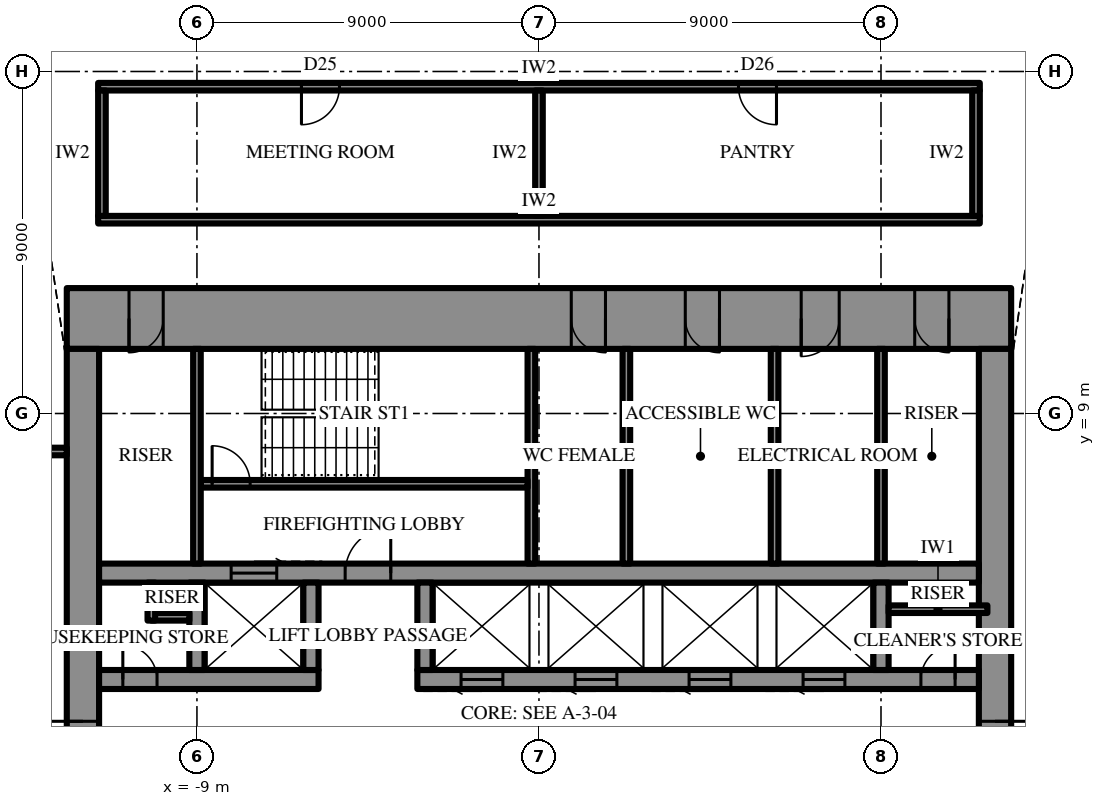
"""IFC4 building model, lengths in metres.
Left out: names, types, materials, properties, quantities, classifications, styles, units other than length and angle.
Written with IfcOpenShell. Run it as: python <this file> out.ifc"""

import sys

from ifc_helpers import new_model, si_unit, direction, frame, frame_2d, origin, place, context, subcontext, project, spatial, rectangle, extrude, element, fill, save


model = new_model("IFC4")
c1 = context("Model", 3, precision=1e-05, world=origin(), true_north=direction((0.0, 1.0)))
c2 = subcontext(c1, "Body", "Model", "MODEL_VIEW")
j1 = project(units=[si_unit("LENGTHUNIT", "METRE"), si_unit("PLANEANGLEUNIT", "RADIAN")], contexts=[c1])
p1 = place(None, origin())
s1 = spatial("IfcSite", under=j1, at=p1, CompositionType="ELEMENT")
p2 = place(p1, origin())
s2 = spatial("IfcBuilding", under=s1, at=p2, CompositionType="ELEMENT")
p3 = place(p2, frame((0.0, 0.0, 340.9)))
s3 = spatial("IfcBuildingStorey", under=s2, at=p3, CompositionType="ELEMENT", Elevation=340.9)
p4 = place(p3, frame((-12.425, 11.5, 0.0), z_axis=(0.0, 0.0, 1.0), x_axis=(1.0, 0.0, 0.0)))
e1 = element("IfcWall", 1, at=p4, inside=s3, PredefinedType="SHEAR", context=c2, shape_type="SweptSolid", body=[
    extrude(rectangle(XDim=24.85, YDim=1.6, at=frame_2d((12.425, 0.0))), origin(), (0.0, 0.0, 1.0), 4.2),
])
p5 = place(p4, frame((13.275, 0.0, 0.0)))
e2 = element("IfcOpeningElement", 2, at=p5, cuts=e1, PredefinedType="OPENING", context=c2, shape_type="SweptSolid", body=[
    extrude(rectangle(XDim=0.9, YDim=2.2, at=frame_2d((0.45, 1.1))), frame((0.0, 0.81, 0.0), z_axis=(0.0, -1.0, 0.0), x_axis=(1.0, 0.0, 0.0)), (0.0, 0.0, 1.0), 1.62),
])
p6 = place(p4, frame((16.275, 0.0, 0.0)))
e3 = element("IfcOpeningElement", 3, at=p6, cuts=e1, PredefinedType="OPENING", context=c2, shape_type="SweptSolid", body=[
    extrude(rectangle(XDim=0.9, YDim=2.2, at=frame_2d((0.45, 1.1))), frame((0.0, 0.81, 0.0), z_axis=(0.0, -1.0, 0.0), x_axis=(1.0, 0.0, 0.0)), (0.0, 0.0, 1.0), 1.62),
])
p7 = place(p4, frame((19.325, 0.0, 0.0)))
e4 = element("IfcOpeningElement", 4, at=p7, cuts=e1, PredefinedType="OPENING", context=c2, shape_type="SweptSolid", body=[
    extrude(rectangle(XDim=1.0, YDim=2.2, at=frame_2d((0.5, 1.1))), frame((0.0, 0.81, 0.0), z_axis=(0.0, -1.0, 0.0), x_axis=(1.0, 0.0, 0.0)), (0.0, 0.0, 1.0), 1.62),
])
p8 = place(p4, frame((1.637, 0.0, 0.0)))
e5 = element("IfcOpeningElement", 5, at=p8, cuts=e1, PredefinedType="OPENING", context=c2, shape_type="SweptSolid", body=[
    extrude(rectangle(XDim=0.9, YDim=2.2, at=frame_2d((0.45, 1.1))), frame((0.0, 0.81, 0.0), z_axis=(0.0, -1.0, 0.0), x_axis=(1.0, 0.0, 0.0)), (0.0, 0.0, 1.0), 1.62),
])
p9 = place(p4, frame((22.312, 0.0, 0.0)))
e6 = element("IfcOpeningElement", 6, at=p9, cuts=e1, PredefinedType="OPENING", context=c2, shape_type="SweptSolid", body=[
    extrude(rectangle(XDim=0.9, YDim=2.2, at=frame_2d((0.45, 1.1))), frame((0.0, 0.81, 0.0), z_axis=(0.0, -1.0, 0.0), x_axis=(1.0, 0.0, 0.0)), (0.0, 0.0, 1.0), 1.62),
])
p10 = place(p3, frame((12.0, -10.7, 0.0), z_axis=(0.0, 0.0, 1.0), x_axis=(0.0, 1.0, 0.0)))
e7 = element("IfcWall", 7, at=p10, inside=s3, PredefinedType="SHEAR", context=c2, shape_type="SweptSolid", body=[
    extrude(rectangle(XDim=21.4, YDim=0.85, at=frame_2d((10.7, 0.0))), origin(), (0.0, 0.0, 1.0), 4.2),
])
p11 = place(p10, frame((9.8, 0.0, 0.0)))
e8 = element("IfcOpeningElement", 8, at=p11, cuts=e7, PredefinedType="OPENING", context=c2, shape_type="SweptSolid", body=[
    extrude(rectangle(XDim=1.8, YDim=2.4, at=frame_2d((0.9, 1.2))), frame((0.0, 0.435, 0.0), z_axis=(0.0, -1.0, 0.0), x_axis=(1.0, 0.0, 0.0)), (0.0, 0.0, 1.0), 0.87),
])
p12 = place(p3, frame((-12.0, 10.7, 0.0), z_axis=(0.0, 0.0, 1.0), x_axis=(0.0, -1.0, 0.0)))
e9 = element("IfcWall", 9, at=p12, inside=s3, PredefinedType="SHEAR", context=c2, shape_type="SweptSolid", body=[
    extrude(rectangle(XDim=21.4, YDim=0.85, at=frame_2d((10.7, 0.0))), origin(), (0.0, 0.0, 1.0), 4.2),
])
p13 = place(p12, frame((9.8, 0.0, 0.0)))
e10 = element("IfcOpeningElement", 10, at=p13, cuts=e9, PredefinedType="OPENING", context=c2, shape_type="SweptSolid", body=[
    extrude(rectangle(XDim=1.8, YDim=2.4, at=frame_2d((0.9, 1.2))), frame((0.0, 0.435, 0.0), z_axis=(0.0, -1.0, 0.0), x_axis=(1.0, 0.0, 0.0)), (0.0, 0.0, 1.0), 0.87),
])
p14 = place(p3, frame((-11.575, 2.0, 0.0), z_axis=(0.0, 0.0, 1.0), x_axis=(1.0, 0.0, 0.0)))
e11 = element("IfcWall", 11, at=p14, inside=s3, PredefinedType="SHEAR", context=c2, shape_type="SweptSolid", body=[
    extrude(rectangle(XDim=5.775, YDim=0.5, at=frame_2d((2.887, 0.0))), origin(), (0.0, 0.0, 1.0), 4.2),
])
p15 = place(p14, frame((0.625, 0.0, 0.0)))
e12 = element("IfcOpeningElement", 12, at=p15, cuts=e11, PredefinedType="OPENING", context=c2, shape_type="SweptSolid", body=[
    extrude(rectangle(XDim=0.9, YDim=2.2, at=frame_2d((0.45, 1.1))), frame((0.0, 0.26, 0.0), z_axis=(0.0, -1.0, 0.0), x_axis=(1.0, 0.0, 0.0)), (0.0, 0.0, 1.0), 0.52),
])
p16 = place(p3, frame((-3.2, 2.0, 0.0), z_axis=(0.0, 0.0, 1.0), x_axis=(1.0, 0.0, 0.0)))
e13 = element("IfcWall", 13, at=p16, inside=s3, PredefinedType="SHEAR", context=c2, shape_type="SweptSolid", body=[
    extrude(rectangle(XDim=14.775, YDim=0.5, at=frame_2d((7.387, 0.0))), origin(), (0.0, 0.0, 1.0), 4.2),
])
p17 = place(p16, frame((13.25, 0.0, 0.0)))
e14 = element("IfcOpeningElement", 14, at=p17, cuts=e13, PredefinedType="OPENING", context=c2, shape_type="SweptSolid", body=[
    extrude(rectangle(XDim=0.9, YDim=2.2, at=frame_2d((0.45, 1.1))), frame((0.0, 0.26, 0.0), z_axis=(0.0, -1.0, 0.0), x_axis=(1.0, 0.0, 0.0)), (0.0, 0.0, 1.0), 0.52),
])
p18 = place(p16, frame((1.15, 0.0, 0.0)))
e15 = element("IfcOpeningElement", 15, at=p18, cuts=e13, PredefinedType="OPENING", context=c2, shape_type="SweptSolid", body=[
    extrude(rectangle(XDim=1.1, YDim=2.2, at=frame_2d((0.55, 1.1))), frame((0.0, 0.26, 0.0), z_axis=(0.0, -1.0, 0.0), x_axis=(1.0, 0.0, 0.0)), (0.0, 0.0, 1.0), 0.52),
])
p19 = place(p16, frame((4.15, 0.0, 0.0)))
e16 = element("IfcOpeningElement", 16, at=p19, cuts=e13, PredefinedType="OPENING", context=c2, shape_type="SweptSolid", body=[
    extrude(rectangle(XDim=1.1, YDim=2.2, at=frame_2d((0.55, 1.1))), frame((0.0, 0.26, 0.0), z_axis=(0.0, -1.0, 0.0), x_axis=(1.0, 0.0, 0.0)), (0.0, 0.0, 1.0), 0.52),
])
p20 = place(p16, frame((7.15, 0.0, 0.0)))
e17 = element("IfcOpeningElement", 17, at=p20, cuts=e13, PredefinedType="OPENING", context=c2, shape_type="SweptSolid", body=[
    extrude(rectangle(XDim=1.1, YDim=2.2, at=frame_2d((0.55, 1.1))), frame((0.0, 0.26, 0.0), z_axis=(0.0, -1.0, 0.0), x_axis=(1.0, 0.0, 0.0)), (0.0, 0.0, 1.0), 0.52),
])
p21 = place(p16, frame((10.15, 0.0, 0.0)))
e18 = element("IfcOpeningElement", 18, at=p21, cuts=e13, PredefinedType="OPENING", context=c2, shape_type="SweptSolid", body=[
    extrude(rectangle(XDim=1.1, YDim=2.2, at=frame_2d((0.55, 1.1))), frame((0.0, 0.26, 0.0), z_axis=(0.0, -1.0, 0.0), x_axis=(1.0, 0.0, 0.0)), (0.0, 0.0, 1.0), 0.52),
])
p22 = place(p3, frame((-11.575, 4.8, 0.0), z_axis=(0.0, 0.0, 1.0), x_axis=(1.0, 0.0, 0.0)))
e19 = element("IfcWall", 19, at=p22, inside=s3, PredefinedType="SHEAR", context=c2, shape_type="SweptSolid", body=[
    extrude(rectangle(XDim=23.15, YDim=0.5, at=frame_2d((11.575, 0.0))), origin(), (0.0, 0.0, 1.0), 4.2),
])
p23 = place(p22, frame((6.475, 0.0, 0.0)))
e20 = element("IfcOpeningElement", 20, at=p23, cuts=e19, PredefinedType="OPENING", context=c2, shape_type="SweptSolid", body=[
    extrude(rectangle(XDim=1.2, YDim=2.2, at=frame_2d((0.6, 1.1))), frame((0.0, 0.26, 0.0), z_axis=(0.0, -1.0, 0.0), x_axis=(1.0, 0.0, 0.0)), (0.0, 0.0, 1.0), 0.52),
])
p24 = place(p22, frame((3.475, 0.0, 0.0)))
e21 = element("IfcOpeningElement", 21, at=p24, cuts=e19, PredefinedType="OPENING", context=c2, shape_type="SweptSolid", body=[
    extrude(rectangle(XDim=1.2, YDim=2.2, at=frame_2d((0.6, 1.1))), frame((0.0, 0.26, 0.0), z_axis=(0.0, -1.0, 0.0), x_axis=(1.0, 0.0, 0.0)), (0.0, 0.0, 1.0), 0.52),
])
for number, where, z_axis, x_axis in (
    (22, (-9.0, 2.25, 0.0), (0.0, 0.0, 1.0), (0.0, 1.0, 0.0)),
    (23, (-6.0, 2.25, 0.0), (0.0, 0.0, 1.0), (0.0, 1.0, 0.0)),
    (24, (-3.0, 2.25, 0.0), (0.0, 0.0, 1.0), (0.0, 1.0, 0.0)),
    (25, (9.0, 2.25, 0.0), (0.0, 0.0, 1.0), (0.0, 1.0, 0.0)),
):
    element("IfcWall", number, at=place(p3, frame(where, z_axis=z_axis, x_axis=x_axis)), inside=s3, PredefinedType="SHEAR", context=c2, shape_type="SweptSolid", body=[
        extrude(rectangle(XDim=2.3, YDim=0.4, at=frame_2d((1.15, 0.0))), origin(), (0.0, 0.0, 1.0), 4.2),
    ])
p25 = place(p3, frame((-0.2, 5.05, 0.0), z_axis=(0.0, 0.0, 1.0), x_axis=(0.0, 1.0, 0.0)))
e26 = element("IfcWall", 26, at=p25, inside=s3, PredefinedType="SHEAR", context=c2, shape_type="SweptSolid", body=[
    extrude(rectangle(XDim=5.65, YDim=0.2, at=frame_2d((2.825, 0.0))), origin(), (0.0, 0.0, 1.0), 4.2),
])
p26 = place(p3, frame((-8.9, 7.15, 0.0), z_axis=(0.0, 0.0, 1.0), x_axis=(1.0, 0.0, 0.0)))
e27 = element("IfcWall", 27, at=p26, inside=s3, PredefinedType="SHEAR", context=c2, shape_type="SweptSolid", body=[
    extrude(rectangle(XDim=8.6, YDim=0.2, at=frame_2d((4.3, 0.0))), origin(), (0.0, 0.0, 1.0), 4.2),
])
p27 = place(p26, frame((0.3, 0.0, 0.0)))
e28 = element("IfcOpeningElement", 28, at=p27, cuts=e27, PredefinedType="OPENING", context=c2, shape_type="SweptSolid", body=[
    extrude(rectangle(XDim=1.0, YDim=2.2, at=frame_2d((0.5, 1.1))), frame((0.0, 0.11, 0.0), z_axis=(0.0, -1.0, 0.0), x_axis=(1.0, 0.0, 0.0)), (0.0, 0.0, 1.0), 0.22),
])
for number, where, z_axis, x_axis in (
    (29, (-9.0, 5.05, 0.0), (0.0, 0.0, 1.0), (0.0, 1.0, 0.0)),
    (30, (9.0, 5.05, 0.0), (0.0, 0.0, 1.0), (0.0, 1.0, 0.0)),
    (31, (2.3, 5.05, 0.0), (0.0, 0.0, 1.0), (0.0, 1.0, 0.0)),
    (32, (6.2, 5.05, 0.0), (0.0, 0.0, 1.0), (0.0, 1.0, 0.0)),
):
    element("IfcWall", number, at=place(p3, frame(where, z_axis=z_axis, x_axis=x_axis)), inside=s3, PredefinedType="PARTITIONING", context=c2, shape_type="SweptSolid", body=[
        extrude(rectangle(XDim=5.65, YDim=0.2, at=frame_2d((2.825, 0.0))), origin(), (0.0, 0.0, 1.0), 4.0),
    ])
for number, where, z_axis, x_axis in (
    (33, (-10.2, 3.65, 0.0), (0.0, 0.0, 1.0), (1.0, 0.0, 0.0)),
    (34, (-10.2, 3.55, 0.0), (0.0, 0.0, 1.0), (0.0, 1.0, 0.0)),
):
    element("IfcWall", number, at=place(p3, frame(where, z_axis=z_axis, x_axis=x_axis)), inside=s3, PredefinedType="PARTITIONING", context=c2, shape_type="SweptSolid", body=[
        extrude(rectangle(XDim=1.0, YDim=0.2, at=frame_2d((0.5, 0.0))), origin(), (0.0, 0.0, 1.0), 4.0),
    ])
p28 = place(p3, frame((9.2, 3.85, 0.0), z_axis=(0.0, 0.0, 1.0), x_axis=(1.0, 0.0, 0.0)))
e35 = element("IfcWall", 35, at=p28, inside=s3, PredefinedType="PARTITIONING", context=c2, shape_type="SweptSolid", body=[
    extrude(rectangle(XDim=2.6, YDim=0.2, at=frame_2d((1.3, 0.0))), origin(), (0.0, 0.0, 1.0), 4.0),
])
p29 = place(p3, frame((-11.6, 14.1, 0.0), z_axis=(0.0, 0.0, 1.0), x_axis=(1.0, 0.0, 0.0)))
e36 = element("IfcWall", 36, at=p29, inside=s3, PredefinedType="PARTITIONING", context=c2, shape_type="SweptSolid", body=[
    extrude(rectangle(XDim=23.2, YDim=0.2, at=frame_2d((11.6, 0.0))), origin(), (0.0, 0.0, 1.0), 4.0),
])
p30 = place(p3, frame((-11.6, 17.6, 0.0), z_axis=(0.0, 0.0, 1.0), x_axis=(1.0, 0.0, 0.0)))
e37 = element("IfcWall", 37, at=p30, inside=s3, PredefinedType="PARTITIONING", context=c2, shape_type="SweptSolid", body=[
    extrude(rectangle(XDim=23.2, YDim=0.2, at=frame_2d((11.6, 0.0))), origin(), (0.0, 0.0, 1.0), 4.0),
])
p31 = place(p30, frame((5.35, 0.0, 0.0)))
e38 = element("IfcOpeningElement", 38, at=p31, cuts=e37, PredefinedType="OPENING", context=c2, shape_type="SweptSolid", body=[
    extrude(rectangle(XDim=1.0, YDim=2.2, at=frame_2d((0.5, 1.1))), frame((0.0, 0.11, 0.0), z_axis=(0.0, -1.0, 0.0), x_axis=(1.0, 0.0, 0.0)), (0.0, 0.0, 1.0), 0.22),
])
p32 = place(p30, frame((16.85, 0.0, 0.0)))
e39 = element("IfcOpeningElement", 39, at=p32, cuts=e37, PredefinedType="OPENING", context=c2, shape_type="SweptSolid", body=[
    extrude(rectangle(XDim=1.0, YDim=2.2, at=frame_2d((0.5, 1.1))), frame((0.0, 0.11, 0.0), z_axis=(0.0, -1.0, 0.0), x_axis=(1.0, 0.0, 0.0)), (0.0, 0.0, 1.0), 0.22),
])
p33 = place(p3, frame((-11.5, 14.2, 0.0), z_axis=(0.0, 0.0, 1.0), x_axis=(0.0, 1.0, 0.0)))
e40 = element("IfcWall", 40, at=p33, inside=s3, PredefinedType="PARTITIONING", context=c2, shape_type="SweptSolid", body=[
    extrude(rectangle(XDim=3.3, YDim=0.2, at=frame_2d((1.65, 0.0))), origin(), (0.0, 0.0, 1.0), 4.0),
])
p34 = place(p3, frame((0.0, 14.2, 0.0), z_axis=(0.0, 0.0, 1.0), x_axis=(0.0, 1.0, 0.0)))
e41 = element("IfcWall", 41, at=p34, inside=s3, PredefinedType="PARTITIONING", context=c2, shape_type="SweptSolid", body=[
    extrude(rectangle(XDim=3.3, YDim=0.2, at=frame_2d((1.65, 0.0))), origin(), (0.0, 0.0, 1.0), 2.992),
])
p35 = place(p3, frame((11.5, 14.2, 0.0), z_axis=(0.0, 0.0, 1.0), x_axis=(0.0, 1.0, 0.0)))
e42 = element("IfcWall", 42, at=p35, inside=s3, PredefinedType="PARTITIONING", context=c2, shape_type="SweptSolid", body=[
    extrude(rectangle(XDim=3.3, YDim=0.2, at=frame_2d((1.65, 0.0))), origin(), (0.0, 0.0, 1.0), 4.0),
])
p36 = place(p3, frame((-12.425, 8.0, 0.0), z_axis=(0.0, 0.0, 1.0), x_axis=(-1.0, 0.0, 0.0)))
e43 = element("IfcWall", 43, at=p36, inside=s3, PredefinedType="PARTITIONING", context=c2, shape_type="SweptSolid", body=[
    extrude(rectangle(XDim=13.59, YDim=0.2, at=frame_2d((6.795, 0.0))), origin(), (0.0, 0.0, 1.0), 4.0),
])
p37 = place(p36, frame((0.859, 0.0, 0.0)))
e44 = element("IfcOpeningElement", 44, at=p37, cuts=e43, PredefinedType="OPENING", context=c2, shape_type="SweptSolid", body=[
    extrude(rectangle(XDim=1.0, YDim=2.2, at=frame_2d((0.5, 1.1))), frame((0.0, 0.11, 0.0), z_axis=(0.0, -1.0, 0.0), x_axis=(1.0, 0.0, 0.0)), (0.0, 0.0, 1.0), 0.22),
])
p38 = place(p11, frame((1.8, 0.0, 0.0), z_axis=(0.0, 0.0, 1.0), x_axis=(-1.0, 0.0, 0.0)))
e45 = element("IfcDoor", 45, at=p38, inside=s3, OperationType="DOUBLE_DOOR_SINGLE_SWING", PredefinedType="DOOR", context=c2, shape_type="SweptSolid", body=[
    extrude(rectangle(XDim=1.8, YDim=2.4, at=frame_2d((0.9, 1.2))), frame((0.0, 0.025, 0.0), z_axis=(0.0, -1.0, 0.0), x_axis=(1.0, 0.0, 0.0)), (0.0, 0.0, 1.0), 0.05),
])
fill(e8, e45)
p39 = place(p13, frame((1.8, 0.0, 0.0), z_axis=(0.0, 0.0, 1.0), x_axis=(-1.0, 0.0, 0.0)))
e46 = element("IfcDoor", 46, at=p39, inside=s3, OperationType="DOUBLE_DOOR_SINGLE_SWING", PredefinedType="DOOR", context=c2, shape_type="SweptSolid", body=[
    extrude(rectangle(XDim=1.8, YDim=2.4, at=frame_2d((0.9, 1.2))), frame((0.0, 0.025, 0.0), z_axis=(0.0, -1.0, 0.0), x_axis=(1.0, 0.0, 0.0)), (0.0, 0.0, 1.0), 0.05),
])
fill(e10, e46)
p40 = place(p23, origin())
e47 = element("IfcDoor", 47, at=p40, inside=s3, OperationType="SINGLE_SWING_LEFT", PredefinedType="DOOR", context=c2, shape_type="SweptSolid", body=[
    extrude(rectangle(XDim=1.2, YDim=2.2, at=frame_2d((0.6, 1.1))), frame((0.0, 0.025, 0.0), z_axis=(0.0, -1.0, 0.0), x_axis=(1.0, 0.0, 0.0)), (0.0, 0.0, 1.0), 0.05),
])
fill(e20, e47)
p41 = place(p27, origin())
e48 = element("IfcDoor", 48, at=p41, inside=s3, OperationType="SINGLE_SWING_RIGHT", PredefinedType="DOOR", context=c2, shape_type="SweptSolid", body=[
    extrude(rectangle(XDim=1.0, YDim=2.2, at=frame_2d((0.5, 1.1))), frame((0.0, 0.025, 0.0), z_axis=(0.0, -1.0, 0.0), x_axis=(1.0, 0.0, 0.0)), (0.0, 0.0, 1.0), 0.05),
])
fill(e28, e48)
p42 = place(p5, frame((0.9, 0.0, 0.0), z_axis=(0.0, 0.0, 1.0), x_axis=(-1.0, 0.0, 0.0)))
e49 = element("IfcDoor", 49, at=p42, inside=s3, OperationType="SINGLE_SWING_RIGHT", PredefinedType="DOOR", context=c2, shape_type="SweptSolid", body=[
    extrude(rectangle(XDim=0.9, YDim=2.2, at=frame_2d((0.45, 1.1))), frame((0.0, 0.025, 0.0), z_axis=(0.0, -1.0, 0.0), x_axis=(1.0, 0.0, 0.0)), (0.0, 0.0, 1.0), 0.05),
])
fill(e2, e49)
p43 = place(p6, frame((0.9, 0.0, 0.0), z_axis=(0.0, 0.0, 1.0), x_axis=(-1.0, 0.0, 0.0)))
e50 = element("IfcDoor", 50, at=p43, inside=s3, OperationType="SINGLE_SWING_RIGHT", PredefinedType="DOOR", context=c2, shape_type="SweptSolid", body=[
    extrude(rectangle(XDim=0.9, YDim=2.2, at=frame_2d((0.45, 1.1))), frame((0.0, 0.025, 0.0), z_axis=(0.0, -1.0, 0.0), x_axis=(1.0, 0.0, 0.0)), (0.0, 0.0, 1.0), 0.05),
])
fill(e3, e50)
p44 = place(p7, frame((1.0, 0.0, 0.0), z_axis=(0.0, 0.0, 1.0), x_axis=(-1.0, 0.0, 0.0)))
e51 = element("IfcDoor", 51, at=p44, inside=s3, OperationType="SINGLE_SWING_LEFT", PredefinedType="DOOR", context=c2, shape_type="SweptSolid", body=[
    extrude(rectangle(XDim=1.0, YDim=2.2, at=frame_2d((0.5, 1.1))), frame((0.0, 0.025, 0.0), z_axis=(0.0, -1.0, 0.0), x_axis=(1.0, 0.0, 0.0)), (0.0, 0.0, 1.0), 0.05),
])
fill(e4, e51)
p45 = place(p8, frame((0.9, 0.0, 0.0), z_axis=(0.0, 0.0, 1.0), x_axis=(-1.0, 0.0, 0.0)))
e52 = element("IfcDoor", 52, at=p45, inside=s3, OperationType="SINGLE_SWING_LEFT", PredefinedType="DOOR", context=c2, shape_type="SweptSolid", body=[
    extrude(rectangle(XDim=0.9, YDim=2.2, at=frame_2d((0.45, 1.1))), frame((0.0, 0.025, 0.0), z_axis=(0.0, -1.0, 0.0), x_axis=(1.0, 0.0, 0.0)), (0.0, 0.0, 1.0), 0.05),
])
fill(e5, e52)
p46 = place(p9, frame((0.9, 0.0, 0.0), z_axis=(0.0, 0.0, 1.0), x_axis=(-1.0, 0.0, 0.0)))
e53 = element("IfcDoor", 53, at=p46, inside=s3, OperationType="SINGLE_SWING_RIGHT", PredefinedType="DOOR", context=c2, shape_type="SweptSolid", body=[
    extrude(rectangle(XDim=0.9, YDim=2.2, at=frame_2d((0.45, 1.1))), frame((0.0, 0.025, 0.0), z_axis=(0.0, -1.0, 0.0), x_axis=(1.0, 0.0, 0.0)), (0.0, 0.0, 1.0), 0.05),
])
fill(e6, e53)
p47 = place(p15, origin())
e54 = element("IfcDoor", 54, at=p47, inside=s3, OperationType="SINGLE_SWING_RIGHT", PredefinedType="DOOR", context=c2, shape_type="SweptSolid", body=[
    extrude(rectangle(XDim=0.9, YDim=2.2, at=frame_2d((0.45, 1.1))), frame((0.0, 0.025, 0.0), z_axis=(0.0, -1.0, 0.0), x_axis=(1.0, 0.0, 0.0)), (0.0, 0.0, 1.0), 0.05),
])
fill(e12, e54)
p48 = place(p17, origin())
e55 = element("IfcDoor", 55, at=p48, inside=s3, OperationType="SINGLE_SWING_LEFT", PredefinedType="DOOR", context=c2, shape_type="SweptSolid", body=[
    extrude(rectangle(XDim=0.9, YDim=2.2, at=frame_2d((0.45, 1.1))), frame((0.0, 0.025, 0.0), z_axis=(0.0, -1.0, 0.0), x_axis=(1.0, 0.0, 0.0)), (0.0, 0.0, 1.0), 0.05),
])
fill(e14, e55)
p49 = place(p24, origin())
e56 = element("IfcDoor", 56, at=p49, inside=s3, OperationType="SLIDING_TO_LEFT", PredefinedType="DOOR", context=c2, shape_type="SweptSolid", body=[
    extrude(rectangle(XDim=1.2, YDim=2.2, at=frame_2d((0.6, 1.1))), frame((0.0, 0.025, 0.0), z_axis=(0.0, -1.0, 0.0), x_axis=(1.0, 0.0, 0.0)), (0.0, 0.0, 1.0), 0.05),
])
fill(e21, e56)
p50 = place(p18, frame((1.1, 0.0, 0.0), z_axis=(0.0, 0.0, 1.0), x_axis=(-1.0, 0.0, 0.0)))
e57 = element("IfcDoor", 57, at=p50, inside=s3, OperationType="SLIDING_TO_LEFT", PredefinedType="DOOR", context=c2, shape_type="SweptSolid", body=[
    extrude(rectangle(XDim=1.1, YDim=2.2, at=frame_2d((0.55, 1.1))), frame((0.0, 0.025, 0.0), z_axis=(0.0, -1.0, 0.0), x_axis=(1.0, 0.0, 0.0)), (0.0, 0.0, 1.0), 0.05),
])
fill(e15, e57)
p51 = place(p19, frame((1.1, 0.0, 0.0), z_axis=(0.0, 0.0, 1.0), x_axis=(-1.0, 0.0, 0.0)))
e58 = element("IfcDoor", 58, at=p51, inside=s3, OperationType="SLIDING_TO_LEFT", PredefinedType="DOOR", context=c2, shape_type="SweptSolid", body=[
    extrude(rectangle(XDim=1.1, YDim=2.2, at=frame_2d((0.55, 1.1))), frame((0.0, 0.025, 0.0), z_axis=(0.0, -1.0, 0.0), x_axis=(1.0, 0.0, 0.0)), (0.0, 0.0, 1.0), 0.05),
])
fill(e16, e58)
p52 = place(p20, frame((1.1, 0.0, 0.0), z_axis=(0.0, 0.0, 1.0), x_axis=(-1.0, 0.0, 0.0)))
e59 = element("IfcDoor", 59, at=p52, inside=s3, OperationType="SLIDING_TO_LEFT", PredefinedType="DOOR", context=c2, shape_type="SweptSolid", body=[
    extrude(rectangle(XDim=1.1, YDim=2.2, at=frame_2d((0.55, 1.1))), frame((0.0, 0.025, 0.0), z_axis=(0.0, -1.0, 0.0), x_axis=(1.0, 0.0, 0.0)), (0.0, 0.0, 1.0), 0.05),
])
fill(e17, e59)
p53 = place(p21, frame((1.1, 0.0, 0.0), z_axis=(0.0, 0.0, 1.0), x_axis=(-1.0, 0.0, 0.0)))
e60 = element("IfcDoor", 60, at=p53, inside=s3, OperationType="SLIDING_TO_LEFT", PredefinedType="DOOR", context=c2, shape_type="SweptSolid", body=[
    extrude(rectangle(XDim=1.1, YDim=2.2, at=frame_2d((0.55, 1.1))), frame((0.0, 0.025, 0.0), z_axis=(0.0, -1.0, 0.0), x_axis=(1.0, 0.0, 0.0)), (0.0, 0.0, 1.0), 0.05),
])
fill(e18, e60)
p54 = place(p31, frame((1.0, 0.0, 0.0), z_axis=(0.0, 0.0, 1.0), x_axis=(-1.0, 0.0, 0.0)))
e61 = element("IfcDoor", 61, at=p54, inside=s3, OperationType="SINGLE_SWING_LEFT", PredefinedType="DOOR", context=c2, shape_type="SweptSolid", body=[
    extrude(rectangle(XDim=1.0, YDim=2.2, at=frame_2d((0.5, 1.1))), frame((0.0, 0.025, 0.0), z_axis=(0.0, -1.0, 0.0), x_axis=(1.0, 0.0, 0.0)), (0.0, 0.0, 1.0), 0.05),
])
fill(e38, e61)
p55 = place(p32, frame((1.0, 0.0, 0.0), z_axis=(0.0, 0.0, 1.0), x_axis=(-1.0, 0.0, 0.0)))
e62 = element("IfcDoor", 62, at=p55, inside=s3, OperationType="SINGLE_SWING_RIGHT", PredefinedType="DOOR", context=c2, shape_type="SweptSolid", body=[
    extrude(rectangle(XDim=1.0, YDim=2.2, at=frame_2d((0.5, 1.1))), frame((0.0, 0.025, 0.0), z_axis=(0.0, -1.0, 0.0), x_axis=(1.0, 0.0, 0.0)), (0.0, 0.0, 1.0), 0.05),
])
fill(e39, e62)
save(model, sys.argv[1])
